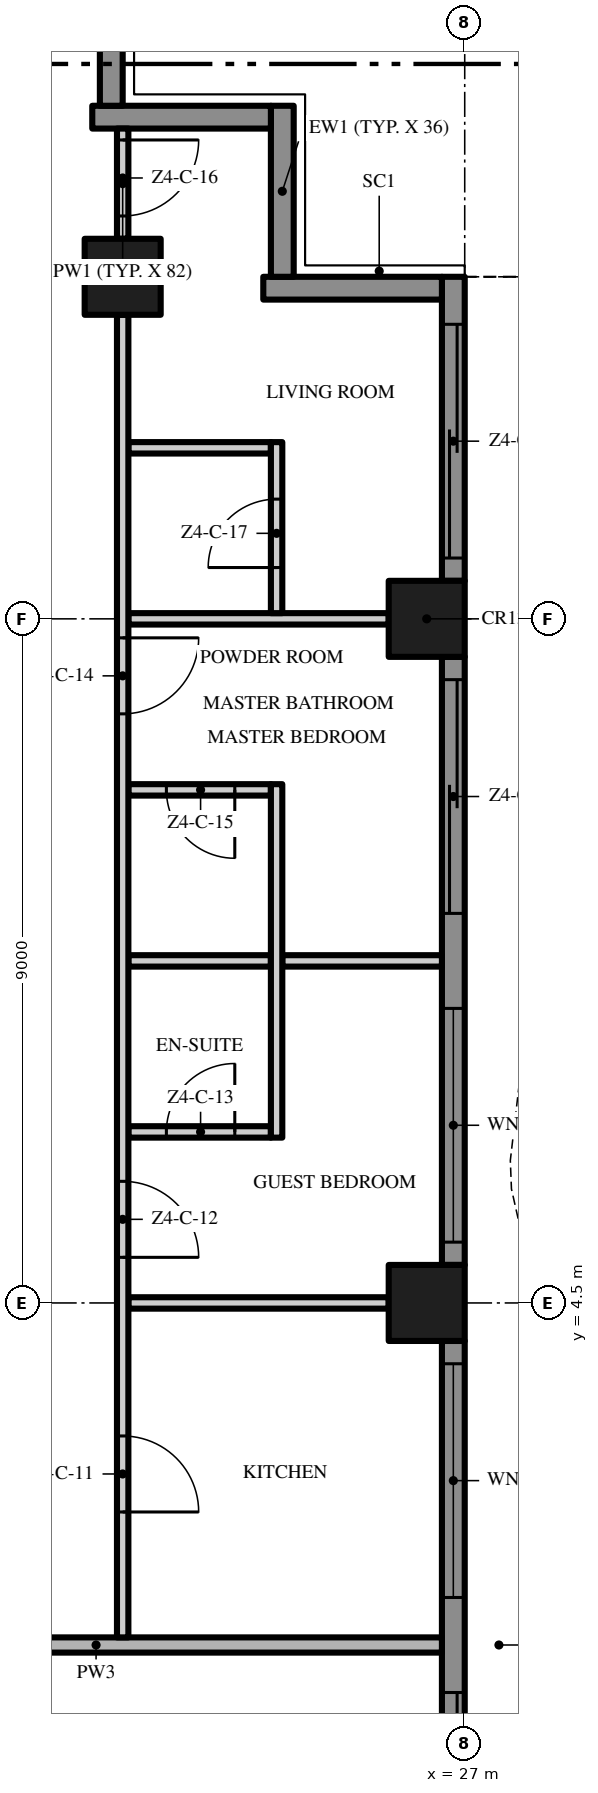
"""IFC4 building model, lengths in metres.
Left out: names, types, materials, properties, quantities, classifications, styles, units other than length and angle.
Written with IfcOpenShell. Run it as: python <this file> out.ifc"""

import sys

from ifc_helpers import new_model, si_unit, direction, frame, frame_2d, origin, origin_2d, place, context, subcontext, project, spatial, polyline, rectangle, outline, extrude, element, fill, save


model = new_model("IFC4")
c1 = context("Model", 3, precision=1e-05, world=origin(), true_north=direction((0.0, 1.0)))
c2 = subcontext(c1, "Body", "Model", "MODEL_VIEW")
j1 = project(units=[si_unit("LENGTHUNIT", "METRE"), si_unit("PLANEANGLEUNIT", "RADIAN")], contexts=[c1])
p1 = place(None, origin())
s1 = spatial("IfcSite", under=j1, at=p1, CompositionType="ELEMENT")
p2 = place(p1, origin())
s2 = spatial("IfcBuilding", under=s1, at=p2, CompositionType="ELEMENT")
p3 = place(p2, frame((0.0, 0.0, 214.8)))
s3 = spatial("IfcBuildingStorey", under=s2, at=p3, CompositionType="ELEMENT", Elevation=214.8)
for number, where, z_axis, x_axis in (
    (1, (26.5, 13.5, 0.0), (0.0, 0.0, 1.0), (1.0, 0.0, 0.0)),
    (2, (22.5, 18.0, 0.0), (0.0, 0.0, 1.0), (1.0, 0.0, 0.0)),
    (3, (26.5, 4.5, 0.0), (0.0, 0.0, 1.0), (1.0, 0.0, 0.0)),
):
    element("IfcColumn", number, at=place(p3, frame(where, z_axis=z_axis, x_axis=x_axis)), inside=s3, PredefinedType="COLUMN", context=c2, shape_type="SweptSolid", body=[
        extrude(rectangle(XDim=1.0, YDim=1.0, at=origin_2d()), origin(), (0.0, 0.0, 1.0), 3.5),
    ])
p4 = place(p3, frame((26.85, 4.0, 0.0), z_axis=(0.0, 0.0, 1.0), x_axis=(0.0, -1.0, 0.0)))
e4 = element("IfcWall", 4, at=p4, inside=s3, PredefinedType="SOLIDWALL", context=c2, shape_type="SweptSolid", body=[
    extrude(rectangle(XDim=8.0, YDim=0.3, at=frame_2d((4.0, 0.0))), origin(), (0.0, 0.0, 1.0), 3.5),
])
p5 = place(p4, frame((4.625, 0.0, 0.0)))
e5 = element("IfcOpeningElement", 5, at=p5, cuts=e4, PredefinedType="OPENING", context=c2, shape_type="SweptSolid", body=[
    extrude(rectangle(XDim=3.075, YDim=2.4, at=frame_2d((1.538, 1.2))), frame((0.0, 0.16, 0.0), z_axis=(0.0, -1.0, 0.0), x_axis=(1.0, 0.0, 0.0)), (0.0, 0.0, 1.0), 0.32),
])
p6 = place(p4, frame((0.3, 0.0, 0.45)))
e6 = element("IfcOpeningElement", 6, at=p6, cuts=e4, PredefinedType="OPENING", context=c2, shape_type="SweptSolid", body=[
    extrude(rectangle(XDim=3.075, YDim=2.65, at=frame_2d((1.538, 1.325))), frame((0.0, 0.16, 0.0), z_axis=(0.0, -1.0, 0.0), x_axis=(1.0, 0.0, 0.0)), (0.0, 0.0, 1.0), 0.32),
])
p7 = place(p3, frame((26.85, 13.0, 0.0), z_axis=(0.0, 0.0, 1.0), x_axis=(0.0, -1.0, 0.0)))
e7 = element("IfcWall", 7, at=p7, inside=s3, PredefinedType="SOLIDWALL", context=c2, shape_type="SweptSolid", body=[
    extrude(rectangle(XDim=8.0, YDim=0.3, at=frame_2d((4.0, 0.0))), origin(), (0.0, 0.0, 1.0), 3.5),
])
p8 = place(p7, frame((4.625, 0.0, 0.45)))
e8 = element("IfcOpeningElement", 8, at=p8, cuts=e7, PredefinedType="OPENING", context=c2, shape_type="SweptSolid", body=[
    extrude(rectangle(XDim=3.075, YDim=2.65, at=frame_2d((1.538, 1.325))), frame((0.0, 0.16, 0.0), z_axis=(0.0, -1.0, 0.0), x_axis=(1.0, 0.0, 0.0)), (0.0, 0.0, 1.0), 0.32),
])
p9 = place(p7, frame((0.3, 0.0, 0.0)))
e9 = element("IfcOpeningElement", 9, at=p9, cuts=e7, PredefinedType="OPENING", context=c2, shape_type="SweptSolid", body=[
    extrude(rectangle(XDim=3.075, YDim=2.4, at=frame_2d((1.538, 1.2))), frame((0.0, 0.16, 0.0), z_axis=(0.0, -1.0, 0.0), x_axis=(1.0, 0.0, 0.0)), (0.0, 0.0, 1.0), 0.32),
])
p10 = place(p3, frame((26.85, 18.0, 0.0), z_axis=(0.0, 0.0, 1.0), x_axis=(0.0, -1.0, 0.0)))
e10 = element("IfcWall", 10, at=p10, inside=s3, PredefinedType="SOLIDWALL", context=c2, shape_type="SweptSolid", body=[
    extrude(rectangle(XDim=4.0, YDim=0.3, at=frame_2d((2.0, 0.0))), origin(), (0.0, 0.0, 1.0), 3.5),
])
p11 = place(p10, frame((0.625, 0.0, 0.0)))
e11 = element("IfcOpeningElement", 11, at=p11, cuts=e10, PredefinedType="OPENING", context=c2, shape_type="SweptSolid", body=[
    extrude(rectangle(XDim=3.075, YDim=2.4, at=frame_2d((1.538, 1.2))), frame((0.0, 0.16, 0.0), z_axis=(0.0, -1.0, 0.0), x_axis=(1.0, 0.0, 0.0)), (0.0, 0.0, 1.0), 0.32),
])
p12 = place(p3, frame((24.35, 17.85, 0.0), z_axis=(0.0, 0.0, 1.0), x_axis=(1.0, 0.0, 0.0)))
e12 = element("IfcWall", 12, at=p12, inside=s3, PredefinedType="SOLIDWALL", context=c2, shape_type="SweptSolid", body=[
    extrude(rectangle(XDim=2.35, YDim=0.3, at=frame_2d((1.175, 0.0))), origin(), (0.0, 0.0, 1.0), 3.5),
])
p13 = place(p3, frame((24.6, 20.25, 0.0), z_axis=(0.0, 0.0, 1.0), x_axis=(0.0, -1.0, 0.0)))
e13 = element("IfcWall", 13, at=p13, inside=s3, PredefinedType="SOLIDWALL", context=c2, shape_type="SweptSolid", body=[
    extrude(rectangle(XDim=2.25, YDim=0.3, at=frame_2d((1.125, 0.0))), origin(), (0.0, 0.0, 1.0), 3.5),
])
p14 = place(p3, frame((22.1, 20.1, 0.0), z_axis=(0.0, 0.0, 1.0), x_axis=(1.0, 0.0, 0.0)))
e14 = element("IfcWall", 14, at=p14, inside=s3, PredefinedType="SOLIDWALL", context=c2, shape_type="SweptSolid", body=[
    extrude(rectangle(XDim=2.35, YDim=0.3, at=frame_2d((1.175, 0.0))), origin(), (0.0, 0.0, 1.0), 3.5),
])
p15 = place(p3, frame((22.35, 22.5, 0.0), z_axis=(0.0, 0.0, 1.0), x_axis=(0.0, -1.0, 0.0)))
e15 = element("IfcWall", 15, at=p15, inside=s3, PredefinedType="SOLIDWALL", context=c2, shape_type="SweptSolid", body=[
    extrude(rectangle(XDim=2.25, YDim=0.3, at=frame_2d((1.125, 0.0))), origin(), (0.0, 0.0, 1.0), 3.5),
])
p16 = place(p3, origin())
e16 = element("IfcWall", 16, at=p16, inside=s3, PredefinedType="USERDEFINED", context=c2, shape_type="SweptSolid", body=[
    extrude(outline(polyline([(29.649, -18.0), (29.985, -16.5), (30.0, -16.125), (29.869, -15.0), (29.345, -13.5), (28.612, -12.0), (27.951, -10.5), (27.615, -9.0), (27.6, -8.625), (27.731, -7.5), (28.255, -6.0), (28.988, -4.5), (29.649, -3.0), (29.985, -1.5), (30.0, -1.125), (29.869, 0.0), (29.345, 1.5), (28.612, 3.0), (27.951, 4.5), (27.615, 6.0), (27.6, 6.375), (27.731, 7.5), (28.255, 9.0), (28.988, 10.5), (29.649, 12.0), (29.985, 13.5), (30.0, 13.875), (29.869, 15.0), (29.345, 16.5), (28.612, 18.0), (28.388, 17.89), (29.114, 16.404), (29.624, 14.944), (29.749, 13.865), (29.736, 13.533), (29.41, 12.079), (28.761, 10.605), (28.024, 9.096), (27.486, 7.556), (27.349, 6.385), (27.366, 5.967), (27.713, 4.421), (28.385, 2.895), (29.114, 1.404), (29.624, -0.056), (29.749, -1.135), (29.736, -1.467), (29.41, -2.921), (28.761, -4.395), (28.024, -5.904), (27.486, -7.444), (27.349, -8.615), (27.366, -9.033), (27.713, -10.579), (28.385, -12.105), (29.114, -13.596), (29.624, -15.056), (29.749, -16.135), (29.736, -16.467), (29.405, -17.945), (29.649, -18.0)])), origin(), (0.0, 0.0, 1.0), 0.9),
])
p17 = place(p3, frame((17.6, 0.0, 0.0), z_axis=(0.0, 0.0, 1.0), x_axis=(1.0, 0.0, 0.0)))
e17 = element("IfcWall", 17, at=p17, inside=s3, PredefinedType="PARTITIONING", context=c2, shape_type="SweptSolid", body=[
    extrude(rectangle(XDim=9.1, YDim=0.2, at=frame_2d((4.55, 0.0))), origin(), (0.0, 0.0, 1.0), 3.5),
])
p18 = place(p3, frame((22.575, 4.5, 0.0), z_axis=(0.0, 0.0, 1.0), x_axis=(1.0, 0.0, 0.0)))
e18 = element("IfcWall", 18, at=p18, inside=s3, PredefinedType="PARTITIONING", context=c2, shape_type="SweptSolid", body=[
    extrude(rectangle(XDim=3.425, YDim=0.15, at=frame_2d((1.712, 0.0))), origin(), (0.0, 0.0, 1.0), 3.5),
])
p19 = place(p3, frame((22.575, 6.75, 0.0), z_axis=(0.0, 0.0, 1.0), x_axis=(1.0, 0.0, 0.0)))
e19 = element("IfcWall", 19, at=p19, inside=s3, PredefinedType="PARTITIONING", context=c2, shape_type="SweptSolid", body=[
    extrude(rectangle(XDim=1.875, YDim=0.15, at=frame_2d((0.938, 0.0))), origin(), (0.0, 0.0, 1.0), 3.5),
])
p20 = place(p19, frame((0.5, 0.0, 0.0)))
e20 = element("IfcOpeningElement", 20, at=p20, cuts=e19, PredefinedType="OPENING", context=c2, shape_type="SweptSolid", body=[
    extrude(rectangle(XDim=0.9, YDim=2.1, at=frame_2d((0.45, 1.05))), frame((0.0, 0.085, 0.0), z_axis=(0.0, -1.0, 0.0), x_axis=(1.0, 0.0, 0.0)), (0.0, 0.0, 1.0), 0.17),
])
p21 = place(p3, frame((22.575, 9.0, 0.0), z_axis=(0.0, 0.0, 1.0), x_axis=(1.0, 0.0, 0.0)))
e21 = element("IfcWall", 21, at=p21, inside=s3, PredefinedType="PARTITIONING", context=c2, shape_type="SweptSolid", body=[
    extrude(rectangle(XDim=1.875, YDim=0.15, at=frame_2d((0.938, 0.0))), origin(), (0.0, 0.0, 1.0), 3.5),
])
p22 = place(p3, frame((24.6, 9.0, 0.0), z_axis=(0.0, 0.0, 1.0), x_axis=(1.0, 0.0, 0.0)))
e22 = element("IfcWall", 22, at=p22, inside=s3, PredefinedType="PARTITIONING", context=c2, shape_type="SweptSolid", body=[
    extrude(rectangle(XDim=2.1, YDim=0.15, at=frame_2d((1.05, 0.0))), origin(), (0.0, 0.0, 1.0), 3.5),
])
p23 = place(p3, frame((24.45, 11.25, 0.0), z_axis=(0.0, 0.0, 1.0), x_axis=(-1.0, 0.0, 0.0)))
e23 = element("IfcWall", 23, at=p23, inside=s3, PredefinedType="PARTITIONING", context=c2, shape_type="SweptSolid", body=[
    extrude(rectangle(XDim=1.875, YDim=0.15, at=frame_2d((0.938, 0.0))), origin(), (0.0, 0.0, 1.0), 3.5),
])
p24 = place(p23, frame((0.475, 0.0, 0.0)))
e24 = element("IfcOpeningElement", 24, at=p24, cuts=e23, PredefinedType="OPENING", context=c2, shape_type="SweptSolid", body=[
    extrude(rectangle(XDim=0.9, YDim=2.1, at=frame_2d((0.45, 1.05))), frame((0.0, 0.085, 0.0), z_axis=(0.0, -1.0, 0.0), x_axis=(1.0, 0.0, 0.0)), (0.0, 0.0, 1.0), 0.17),
])
p25 = place(p3, frame((22.575, 13.5, 0.0), z_axis=(0.0, 0.0, 1.0), x_axis=(1.0, 0.0, 0.0)))
e25 = element("IfcWall", 25, at=p25, inside=s3, PredefinedType="PARTITIONING", context=c2, shape_type="SweptSolid", body=[
    extrude(rectangle(XDim=3.425, YDim=0.15, at=frame_2d((1.712, 0.0))), origin(), (0.0, 0.0, 1.0), 3.5),
])
p26 = place(p3, frame((22.575, 15.75, 0.0), z_axis=(0.0, 0.0, 1.0), x_axis=(1.0, 0.0, 0.0)))
e26 = element("IfcWall", 26, at=p26, inside=s3, PredefinedType="PARTITIONING", context=c2, shape_type="SweptSolid", body=[
    extrude(rectangle(XDim=1.875, YDim=0.15, at=frame_2d((0.938, 0.0))), origin(), (0.0, 0.0, 1.0), 3.5),
])
p27 = place(p3, frame((22.5, 17.5, 0.0), z_axis=(0.0, 0.0, 1.0), x_axis=(0.0, -1.0, 0.0)))
e27 = element("IfcWall", 27, at=p27, inside=s3, PredefinedType="PARTITIONING", context=c2, shape_type="SweptSolid", body=[
    extrude(rectangle(XDim=17.4, YDim=0.15, at=frame_2d((8.7, 0.0))), origin(), (0.0, 0.0, 1.0), 3.5),
])
p28 = place(p27, frame((14.75, 0.0, 0.0)))
e28 = element("IfcOpeningElement", 28, at=p28, cuts=e27, PredefinedType="OPENING", context=c2, shape_type="SweptSolid", body=[
    extrude(rectangle(XDim=1.0, YDim=2.4, at=frame_2d((0.5, 1.2))), frame((0.0, 0.085, 0.0), z_axis=(0.0, -1.0, 0.0), x_axis=(1.0, 0.0, 0.0)), (0.0, 0.0, 1.0), 0.17),
])
p29 = place(p27, frame((11.4, 0.0, 0.0)))
e29 = element("IfcOpeningElement", 29, at=p29, cuts=e27, PredefinedType="OPENING", context=c2, shape_type="SweptSolid", body=[
    extrude(rectangle(XDim=1.0, YDim=2.4, at=frame_2d((0.5, 1.2))), frame((0.0, 0.085, 0.0), z_axis=(0.0, -1.0, 0.0), x_axis=(1.0, 0.0, 0.0)), (0.0, 0.0, 1.0), 0.17),
])
p30 = place(p27, frame((4.25, 0.0, 0.0)))
e30 = element("IfcOpeningElement", 30, at=p30, cuts=e27, PredefinedType="OPENING", context=c2, shape_type="SweptSolid", body=[
    extrude(rectangle(XDim=1.0, YDim=2.4, at=frame_2d((0.5, 1.2))), frame((0.0, 0.085, 0.0), z_axis=(0.0, -1.0, 0.0), x_axis=(1.0, 0.0, 0.0)), (0.0, 0.0, 1.0), 0.17),
])
p31 = place(p3, frame((22.5, 19.95, 0.0), z_axis=(0.0, 0.0, 1.0), x_axis=(0.0, -1.0, 0.0)))
e31 = element("IfcWall", 31, at=p31, inside=s3, PredefinedType="PARTITIONING", context=c2, shape_type="SweptSolid", body=[
    extrude(rectangle(XDim=1.45, YDim=0.15, at=frame_2d((0.725, 0.0))), origin(), (0.0, 0.0, 1.0), 3.5),
])
p32 = place(p31, frame((0.15, 0.0, 0.0)))
e32 = element("IfcOpeningElement", 32, at=p32, cuts=e31, PredefinedType="OPENING", context=c2, shape_type="SweptSolid", body=[
    extrude(rectangle(XDim=1.0, YDim=2.4, at=frame_2d((0.5, 1.2))), frame((0.0, 0.085, 0.0), z_axis=(0.0, -1.0, 0.0), x_axis=(1.0, 0.0, 0.0)), (0.0, 0.0, 1.0), 0.17),
])
p33 = place(p3, frame((24.525, 6.675, 0.0), z_axis=(0.0, 0.0, 1.0), x_axis=(0.0, 1.0, 0.0)))
e33 = element("IfcWall", 33, at=p33, inside=s3, PredefinedType="PARTITIONING", context=c2, shape_type="SweptSolid", body=[
    extrude(rectangle(XDim=4.65, YDim=0.15, at=frame_2d((2.325, 0.0))), origin(), (0.0, 0.0, 1.0), 3.5),
])
p34 = place(p3, frame((24.525, 13.575, 0.0), z_axis=(0.0, 0.0, 1.0), x_axis=(0.0, 1.0, 0.0)))
e34 = element("IfcWall", 34, at=p34, inside=s3, PredefinedType="PARTITIONING", context=c2, shape_type="SweptSolid", body=[
    extrude(rectangle(XDim=2.25, YDim=0.15, at=frame_2d((1.125, 0.0))), origin(), (0.0, 0.0, 1.0), 3.5),
])
p35 = place(p34, frame((0.6, 0.0, 0.0)))
e35 = element("IfcOpeningElement", 35, at=p35, cuts=e34, PredefinedType="OPENING", context=c2, shape_type="SweptSolid", body=[
    extrude(rectangle(XDim=0.9, YDim=2.1, at=frame_2d((0.45, 1.05))), frame((0.0, 0.085, 0.0), z_axis=(0.0, -1.0, 0.0), x_axis=(1.0, 0.0, 0.0)), (0.0, 0.0, 1.0), 0.17),
])
p36 = place(p5, origin())
e36 = element("IfcDoor", 36, at=p36, inside=s3, OperationType="SINGLE_SWING_LEFT", PredefinedType="DOOR", context=c2, shape_type="SweptSolid", body=[
    extrude(rectangle(XDim=3.075, YDim=2.4, at=frame_2d((1.538, 1.2))), frame((0.0, 0.025, 0.0), z_axis=(0.0, -1.0, 0.0), x_axis=(1.0, 0.0, 0.0)), (0.0, 0.0, 1.0), 0.05),
])
fill(e5, e36)
p37 = place(p6, origin())
e37 = element("IfcWindow", 37, at=p37, inside=s3, PartitioningType="SINGLE_PANEL", PredefinedType="WINDOW", context=c2, shape_type="SweptSolid", body=[
    extrude(rectangle(XDim=3.075, YDim=2.65, at=frame_2d((1.538, 1.325))), frame((0.0, 0.03, 0.0), z_axis=(0.0, -1.0, 0.0), x_axis=(1.0, 0.0, 0.0)), (0.0, 0.0, 1.0), 0.06),
])
fill(e6, e37)
p38 = place(p8, origin())
e38 = element("IfcWindow", 38, at=p38, inside=s3, PartitioningType="SINGLE_PANEL", PredefinedType="WINDOW", context=c2, shape_type="SweptSolid", body=[
    extrude(rectangle(XDim=3.075, YDim=2.65, at=frame_2d((1.538, 1.325))), frame((0.0, 0.03, 0.0), z_axis=(0.0, -1.0, 0.0), x_axis=(1.0, 0.0, 0.0)), (0.0, 0.0, 1.0), 0.06),
])
fill(e8, e38)
p39 = place(p9, origin())
e39 = element("IfcDoor", 39, at=p39, inside=s3, OperationType="SINGLE_SWING_LEFT", PredefinedType="DOOR", context=c2, shape_type="SweptSolid", body=[
    extrude(rectangle(XDim=3.075, YDim=2.4, at=frame_2d((1.538, 1.2))), frame((0.0, 0.025, 0.0), z_axis=(0.0, -1.0, 0.0), x_axis=(1.0, 0.0, 0.0)), (0.0, 0.0, 1.0), 0.05),
])
fill(e9, e39)
p40 = place(p11, origin())
e40 = element("IfcDoor", 40, at=p40, inside=s3, OperationType="SINGLE_SWING_LEFT", PredefinedType="DOOR", context=c2, shape_type="SweptSolid", body=[
    extrude(rectangle(XDim=3.075, YDim=2.4, at=frame_2d((1.538, 1.2))), frame((0.0, 0.025, 0.0), z_axis=(0.0, -1.0, 0.0), x_axis=(1.0, 0.0, 0.0)), (0.0, 0.0, 1.0), 0.05),
])
fill(e11, e40)
p41 = place(p28, origin())
e41 = element("IfcDoor", 41, at=p41, inside=s3, OperationType="SINGLE_SWING_RIGHT", PredefinedType="DOOR", context=c2, shape_type="SweptSolid", body=[
    extrude(rectangle(XDim=1.0, YDim=2.4, at=frame_2d((0.5, 1.2))), frame((0.0, 0.025, 0.0), z_axis=(0.0, -1.0, 0.0), x_axis=(1.0, 0.0, 0.0)), (0.0, 0.0, 1.0), 0.05),
])
fill(e28, e41)
p42 = place(p29, origin())
e42 = element("IfcDoor", 42, at=p42, inside=s3, OperationType="SINGLE_SWING_RIGHT", PredefinedType="DOOR", context=c2, shape_type="SweptSolid", body=[
    extrude(rectangle(XDim=1.0, YDim=2.4, at=frame_2d((0.5, 1.2))), frame((0.0, 0.025, 0.0), z_axis=(0.0, -1.0, 0.0), x_axis=(1.0, 0.0, 0.0)), (0.0, 0.0, 1.0), 0.05),
])
fill(e29, e42)
p43 = place(p20, origin())
e43 = element("IfcDoor", 43, at=p43, inside=s3, OperationType="SINGLE_SWING_RIGHT", PredefinedType="DOOR", context=c2, shape_type="SweptSolid", body=[
    extrude(rectangle(XDim=0.9, YDim=2.1, at=frame_2d((0.45, 1.05))), frame((0.0, 0.025, 0.0), z_axis=(0.0, -1.0, 0.0), x_axis=(1.0, 0.0, 0.0)), (0.0, 0.0, 1.0), 0.05),
])
fill(e20, e43)
p44 = place(p30, origin())
e44 = element("IfcDoor", 44, at=p44, inside=s3, OperationType="SINGLE_SWING_LEFT", PredefinedType="DOOR", context=c2, shape_type="SweptSolid", body=[
    extrude(rectangle(XDim=1.0, YDim=2.4, at=frame_2d((0.5, 1.2))), frame((0.0, 0.025, 0.0), z_axis=(0.0, -1.0, 0.0), x_axis=(1.0, 0.0, 0.0)), (0.0, 0.0, 1.0), 0.05),
])
fill(e30, e44)
p45 = place(p24, origin())
e45 = element("IfcDoor", 45, at=p45, inside=s3, OperationType="SINGLE_SWING_LEFT", PredefinedType="DOOR", context=c2, shape_type="SweptSolid", body=[
    extrude(rectangle(XDim=0.9, YDim=2.1, at=frame_2d((0.45, 1.05))), frame((0.0, 0.025, 0.0), z_axis=(0.0, -1.0, 0.0), x_axis=(1.0, 0.0, 0.0)), (0.0, 0.0, 1.0), 0.05),
])
fill(e24, e45)
p46 = place(p32, origin())
e46 = element("IfcDoor", 46, at=p46, inside=s3, OperationType="SINGLE_SWING_LEFT", PredefinedType="DOOR", context=c2, shape_type="SweptSolid", body=[
    extrude(rectangle(XDim=1.0, YDim=2.4, at=frame_2d((0.5, 1.2))), frame((0.0, 0.025, 0.0), z_axis=(0.0, -1.0, 0.0), x_axis=(1.0, 0.0, 0.0)), (0.0, 0.0, 1.0), 0.05),
])
fill(e32, e46)
p47 = place(p35, origin())
e47 = element("IfcDoor", 47, at=p47, inside=s3, OperationType="SINGLE_SWING_LEFT", PredefinedType="DOOR", context=c2, shape_type="SweptSolid", body=[
    extrude(rectangle(XDim=0.9, YDim=2.1, at=frame_2d((0.45, 1.05))), frame((0.0, 0.025, 0.0), z_axis=(0.0, -1.0, 0.0), x_axis=(1.0, 0.0, 0.0)), (0.0, 0.0, 1.0), 0.05),
])
fill(e35, e47)
save(model, sys.argv[1])
